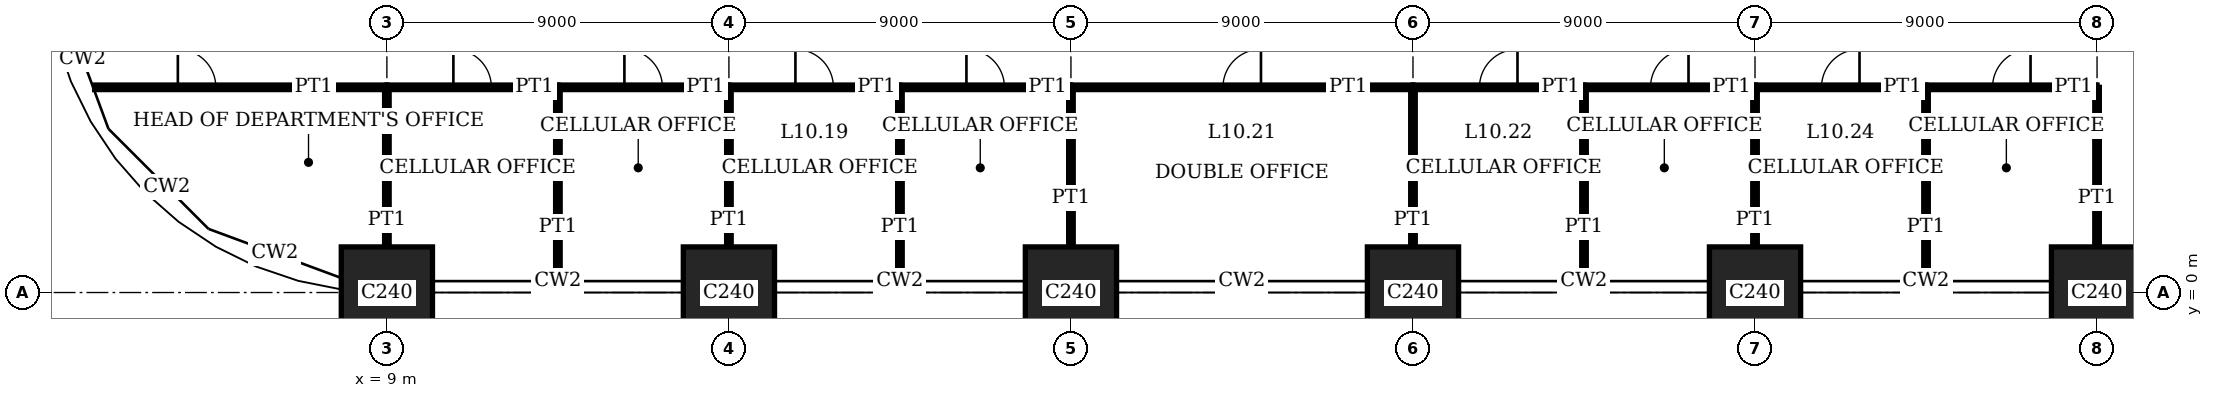
"""IFC4 building model, lengths in metres.
Left out: names, types, materials, properties, quantities, classifications, styles, units other than length and angle.
Written with IfcOpenShell. Run it as: python <this file> out.ifc"""

import sys

from ifc_helpers import new_model, si_unit, direction, frame, frame_2d, origin, origin_2d, place, context, subcontext, project, spatial, rectangle, extrude, element, fill, save


model = new_model("IFC4")
c1 = context("Model", 3, precision=1e-05, world=origin(), true_north=direction((0.0, 1.0)))
c2 = subcontext(c1, "Body", "Model", "MODEL_VIEW")
j1 = project(units=[si_unit("LENGTHUNIT", "METRE"), si_unit("PLANEANGLEUNIT", "RADIAN")], contexts=[c1])
p1 = place(None, origin())
s1 = spatial("IfcSite", under=j1, at=p1, CompositionType="ELEMENT")
p2 = place(p1, origin())
s2 = spatial("IfcBuilding", under=s1, at=p2, CompositionType="ELEMENT")
p3 = place(p2, frame((0.0, 0.0, 43.8)))
s3 = spatial("IfcBuildingStorey", under=s2, at=p3, CompositionType="ELEMENT", Elevation=43.8)
for number, where, z_axis, x_axis in (
    (1, (9.0, 0.0, 0.0), (0.0, 0.0, 1.0), (1.0, 0.0, 0.0)),
    (2, (18.0, 0.0, 0.0), (0.0, 0.0, 1.0), (1.0, 0.0, 0.0)),
    (3, (27.0, 0.0, 0.0), (0.0, 0.0, 1.0), (1.0, 0.0, 0.0)),
    (4, (36.0, 0.0, 0.0), (0.0, 0.0, 1.0), (1.0, 0.0, 0.0)),
    (5, (45.0, 0.0, 0.0), (0.0, 0.0, 1.0), (1.0, 0.0, 0.0)),
    (6, (54.0, 0.0, 0.0), (0.0, 0.0, 1.0), (1.0, 0.0, 0.0)),
):
    element("IfcColumn", number, at=place(p3, frame(where, z_axis=z_axis, x_axis=x_axis)), inside=s3, PredefinedType="COLUMN", context=c2, shape_type="SweptSolid", body=[
        extrude(rectangle(XDim=2.4, YDim=2.4, at=origin_2d()), origin(), (0.0, 0.0, 1.0), 4.0),
    ])
p4 = place(p3, frame((9.0, 5.4, 0.0), z_axis=(0.0, 0.0, 1.0), x_axis=(1.0, 0.0, 0.0)))
e7 = element("IfcWall", 7, at=p4, inside=s3, PredefinedType="PARTITIONING", context=c2, shape_type="SweptSolid", body=[
    extrude(rectangle(XDim=4.5, YDim=0.12, at=frame_2d((2.25, 0.0))), origin(), (0.0, 0.0, 1.0), 3.75),
])
p5 = place(p4, frame((1.75, 0.0, 0.0)))
e8 = element("IfcOpeningElement", 8, at=p5, cuts=e7, PredefinedType="OPENING", context=c2, shape_type="SweptSolid", body=[
    extrude(rectangle(XDim=1.0, YDim=2.4, at=frame_2d((0.5, 1.2))), frame((0.0, 0.07, 0.0), z_axis=(0.0, -1.0, 0.0), x_axis=(1.0, 0.0, 0.0)), (0.0, 0.0, 1.0), 0.14),
])
p6 = place(p3, frame((13.5, 5.4, 0.0), z_axis=(0.0, 0.0, 1.0), x_axis=(1.0, 0.0, 0.0)))
e9 = element("IfcWall", 9, at=p6, inside=s3, PredefinedType="PARTITIONING", context=c2, shape_type="SweptSolid", body=[
    extrude(rectangle(XDim=4.5, YDim=0.12, at=frame_2d((2.25, 0.0))), origin(), (0.0, 0.0, 1.0), 3.75),
])
p7 = place(p6, frame((1.75, 0.0, 0.0)))
e10 = element("IfcOpeningElement", 10, at=p7, cuts=e9, PredefinedType="OPENING", context=c2, shape_type="SweptSolid", body=[
    extrude(rectangle(XDim=1.0, YDim=2.4, at=frame_2d((0.5, 1.2))), frame((0.0, 0.07, 0.0), z_axis=(0.0, -1.0, 0.0), x_axis=(1.0, 0.0, 0.0)), (0.0, 0.0, 1.0), 0.14),
])
p8 = place(p3, frame((18.0, 5.4, 0.0), z_axis=(0.0, 0.0, 1.0), x_axis=(1.0, 0.0, 0.0)))
e11 = element("IfcWall", 11, at=p8, inside=s3, PredefinedType="PARTITIONING", context=c2, shape_type="SweptSolid", body=[
    extrude(rectangle(XDim=4.5, YDim=0.12, at=frame_2d((2.25, 0.0))), origin(), (0.0, 0.0, 1.0), 3.75),
])
p9 = place(p8, frame((1.75, 0.0, 0.0)))
e12 = element("IfcOpeningElement", 12, at=p9, cuts=e11, PredefinedType="OPENING", context=c2, shape_type="SweptSolid", body=[
    extrude(rectangle(XDim=1.0, YDim=2.4, at=frame_2d((0.5, 1.2))), frame((0.0, 0.07, 0.0), z_axis=(0.0, -1.0, 0.0), x_axis=(1.0, 0.0, 0.0)), (0.0, 0.0, 1.0), 0.14),
])
p10 = place(p3, frame((22.5, 5.4, 0.0), z_axis=(0.0, 0.0, 1.0), x_axis=(1.0, 0.0, 0.0)))
e13 = element("IfcWall", 13, at=p10, inside=s3, PredefinedType="PARTITIONING", context=c2, shape_type="SweptSolid", body=[
    extrude(rectangle(XDim=4.5, YDim=0.12, at=frame_2d((2.25, 0.0))), origin(), (0.0, 0.0, 1.0), 3.75),
])
p11 = place(p10, frame((1.75, 0.0, 0.0)))
e14 = element("IfcOpeningElement", 14, at=p11, cuts=e13, PredefinedType="OPENING", context=c2, shape_type="SweptSolid", body=[
    extrude(rectangle(XDim=1.0, YDim=2.4, at=frame_2d((0.5, 1.2))), frame((0.0, 0.07, 0.0), z_axis=(0.0, -1.0, 0.0), x_axis=(1.0, 0.0, 0.0)), (0.0, 0.0, 1.0), 0.14),
])
p12 = place(p3, frame((27.0, 5.4, 0.0), z_axis=(0.0, 0.0, 1.0), x_axis=(1.0, 0.0, 0.0)))
e15 = element("IfcWall", 15, at=p12, inside=s3, PredefinedType="PARTITIONING", context=c2, shape_type="SweptSolid", body=[
    extrude(rectangle(XDim=9.0, YDim=0.12, at=frame_2d((4.5, 0.0))), origin(), (0.0, 0.0, 1.0), 3.75),
])
p13 = place(p12, frame((4.0, 0.0, 0.0)))
e16 = element("IfcOpeningElement", 16, at=p13, cuts=e15, PredefinedType="OPENING", context=c2, shape_type="SweptSolid", body=[
    extrude(rectangle(XDim=1.0, YDim=2.4, at=frame_2d((0.5, 1.2))), frame((0.0, 0.07, 0.0), z_axis=(0.0, -1.0, 0.0), x_axis=(1.0, 0.0, 0.0)), (0.0, 0.0, 1.0), 0.14),
])
p14 = place(p3, frame((36.0, 5.4, 0.0), z_axis=(0.0, 0.0, 1.0), x_axis=(1.0, 0.0, 0.0)))
e17 = element("IfcWall", 17, at=p14, inside=s3, PredefinedType="PARTITIONING", context=c2, shape_type="SweptSolid", body=[
    extrude(rectangle(XDim=4.5, YDim=0.12, at=frame_2d((2.25, 0.0))), origin(), (0.0, 0.0, 1.0), 3.75),
])
p15 = place(p14, frame((1.75, 0.0, 0.0)))
e18 = element("IfcOpeningElement", 18, at=p15, cuts=e17, PredefinedType="OPENING", context=c2, shape_type="SweptSolid", body=[
    extrude(rectangle(XDim=1.0, YDim=2.4, at=frame_2d((0.5, 1.2))), frame((0.0, 0.07, 0.0), z_axis=(0.0, -1.0, 0.0), x_axis=(1.0, 0.0, 0.0)), (0.0, 0.0, 1.0), 0.14),
])
p16 = place(p3, frame((40.5, 5.4, 0.0), z_axis=(0.0, 0.0, 1.0), x_axis=(1.0, 0.0, 0.0)))
e19 = element("IfcWall", 19, at=p16, inside=s3, PredefinedType="PARTITIONING", context=c2, shape_type="SweptSolid", body=[
    extrude(rectangle(XDim=4.5, YDim=0.12, at=frame_2d((2.25, 0.0))), origin(), (0.0, 0.0, 1.0), 3.75),
])
p17 = place(p16, frame((1.75, 0.0, 0.0)))
e20 = element("IfcOpeningElement", 20, at=p17, cuts=e19, PredefinedType="OPENING", context=c2, shape_type="SweptSolid", body=[
    extrude(rectangle(XDim=1.0, YDim=2.4, at=frame_2d((0.5, 1.2))), frame((0.0, 0.07, 0.0), z_axis=(0.0, -1.0, 0.0), x_axis=(1.0, 0.0, 0.0)), (0.0, 0.0, 1.0), 0.14),
])
p18 = place(p3, frame((45.0, 5.4, 0.0), z_axis=(0.0, 0.0, 1.0), x_axis=(1.0, 0.0, 0.0)))
e21 = element("IfcWall", 21, at=p18, inside=s3, PredefinedType="PARTITIONING", context=c2, shape_type="SweptSolid", body=[
    extrude(rectangle(XDim=4.5, YDim=0.12, at=frame_2d((2.25, 0.0))), origin(), (0.0, 0.0, 1.0), 3.75),
])
p19 = place(p18, frame((1.75, 0.0, 0.0)))
e22 = element("IfcOpeningElement", 22, at=p19, cuts=e21, PredefinedType="OPENING", context=c2, shape_type="SweptSolid", body=[
    extrude(rectangle(XDim=1.0, YDim=2.4, at=frame_2d((0.5, 1.2))), frame((0.0, 0.07, 0.0), z_axis=(0.0, -1.0, 0.0), x_axis=(1.0, 0.0, 0.0)), (0.0, 0.0, 1.0), 0.14),
])
p20 = place(p3, frame((49.5, 5.4, 0.0), z_axis=(0.0, 0.0, 1.0), x_axis=(1.0, 0.0, 0.0)))
e23 = element("IfcWall", 23, at=p20, inside=s3, PredefinedType="PARTITIONING", context=c2, shape_type="SweptSolid", body=[
    extrude(rectangle(XDim=4.5, YDim=0.12, at=frame_2d((2.25, 0.0))), origin(), (0.0, 0.0, 1.0), 3.75),
])
p21 = place(p20, frame((1.75, 0.0, 0.0)))
e24 = element("IfcOpeningElement", 24, at=p21, cuts=e23, PredefinedType="OPENING", context=c2, shape_type="SweptSolid", body=[
    extrude(rectangle(XDim=1.0, YDim=2.4, at=frame_2d((0.5, 1.2))), frame((0.0, 0.07, 0.0), z_axis=(0.0, -1.0, 0.0), x_axis=(1.0, 0.0, 0.0)), (0.0, 0.0, 1.0), 0.14),
])
p22 = place(p3, frame((1.31, 5.4, 0.0), z_axis=(0.0, 0.0, 1.0), x_axis=(1.0, 0.0, 0.0)))
e25 = element("IfcWall", 25, at=p22, inside=s3, PredefinedType="PARTITIONING", context=c2, shape_type="SweptSolid", body=[
    extrude(rectangle(XDim=7.69, YDim=0.12, at=frame_2d((3.845, 0.0))), origin(), (0.0, 0.0, 1.0), 3.75),
])
p23 = place(p22, frame((2.19, 0.0, 0.0)))
e26 = element("IfcOpeningElement", 26, at=p23, cuts=e25, PredefinedType="OPENING", context=c2, shape_type="SweptSolid", body=[
    extrude(rectangle(XDim=1.0, YDim=2.4, at=frame_2d((0.5, 1.2))), frame((0.0, 0.07, 0.0), z_axis=(0.0, -1.0, 0.0), x_axis=(1.0, 0.0, 0.0)), (0.0, 0.0, 1.0), 0.14),
])
p24 = place(p3, frame((9.0, 1.2, 0.0), z_axis=(0.0, 0.0, 1.0), x_axis=(0.0, 1.0, 0.0)))
e27 = element("IfcWall", 27, at=p24, inside=s3, PredefinedType="PARTITIONING", context=c2, shape_type="SweptSolid", body=[
    extrude(rectangle(XDim=4.2, YDim=0.12, at=frame_2d((2.1, 0.0))), origin(), (0.0, 0.0, 1.0), 3.05),
])
p25 = place(p3, frame((13.5, 0.31, 0.0), z_axis=(0.0, 0.0, 1.0), x_axis=(0.0, 1.0, 0.0)))
e28 = element("IfcWall", 28, at=p25, inside=s3, PredefinedType="PARTITIONING", context=c2, shape_type="SweptSolid", body=[
    extrude(rectangle(XDim=5.09, YDim=0.12, at=frame_2d((2.545, 0.0))), origin(), (0.0, 0.0, 1.0), 3.75),
])
p26 = place(p3, frame((18.0, 1.2, 0.0), z_axis=(0.0, 0.0, 1.0), x_axis=(0.0, 1.0, 0.0)))
e29 = element("IfcWall", 29, at=p26, inside=s3, PredefinedType="PARTITIONING", context=c2, shape_type="SweptSolid", body=[
    extrude(rectangle(XDim=4.2, YDim=0.12, at=frame_2d((2.1, 0.0))), origin(), (0.0, 0.0, 1.0), 3.05),
])
p27 = place(p3, frame((22.5, 0.31, 0.0), z_axis=(0.0, 0.0, 1.0), x_axis=(0.0, 1.0, 0.0)))
e30 = element("IfcWall", 30, at=p27, inside=s3, PredefinedType="PARTITIONING", context=c2, shape_type="SweptSolid", body=[
    extrude(rectangle(XDim=5.09, YDim=0.12, at=frame_2d((2.545, 0.0))), origin(), (0.0, 0.0, 1.0), 3.75),
])
for number, where, z_axis, x_axis in (
    (31, (27.0, 1.2, 0.0), (0.0, 0.0, 1.0), (0.0, 1.0, 0.0)),
    (32, (36.0, 1.2, 0.0), (0.0, 0.0, 1.0), (0.0, 1.0, 0.0)),
):
    element("IfcWall", number, at=place(p3, frame(where, z_axis=z_axis, x_axis=x_axis)), inside=s3, PredefinedType="PARTITIONING", context=c2, shape_type="SweptSolid", body=[
        extrude(rectangle(XDim=4.2, YDim=0.12, at=frame_2d((2.1, 0.0))), origin(), (0.0, 0.0, 1.0), 3.05),
    ])
p28 = place(p3, frame((40.5, 0.31, 0.0), z_axis=(0.0, 0.0, 1.0), x_axis=(0.0, 1.0, 0.0)))
e33 = element("IfcWall", 33, at=p28, inside=s3, PredefinedType="PARTITIONING", context=c2, shape_type="SweptSolid", body=[
    extrude(rectangle(XDim=5.09, YDim=0.12, at=frame_2d((2.545, 0.0))), origin(), (0.0, 0.0, 1.0), 3.75),
])
p29 = place(p3, frame((45.0, 1.2, 0.0), z_axis=(0.0, 0.0, 1.0), x_axis=(0.0, 1.0, 0.0)))
e34 = element("IfcWall", 34, at=p29, inside=s3, PredefinedType="PARTITIONING", context=c2, shape_type="SweptSolid", body=[
    extrude(rectangle(XDim=4.2, YDim=0.12, at=frame_2d((2.1, 0.0))), origin(), (0.0, 0.0, 1.0), 3.05),
])
p30 = place(p3, frame((49.5, 0.31, 0.0), z_axis=(0.0, 0.0, 1.0), x_axis=(0.0, 1.0, 0.0)))
e35 = element("IfcWall", 35, at=p30, inside=s3, PredefinedType="PARTITIONING", context=c2, shape_type="SweptSolid", body=[
    extrude(rectangle(XDim=5.09, YDim=0.12, at=frame_2d((2.545, 0.0))), origin(), (0.0, 0.0, 1.0), 3.75),
])
p31 = place(p3, frame((54.0, 1.2, 0.0), z_axis=(0.0, 0.0, 1.0), x_axis=(0.0, 1.0, 0.0)))
e36 = element("IfcWall", 36, at=p31, inside=s3, PredefinedType="PARTITIONING", context=c2, shape_type="SweptSolid", body=[
    extrude(rectangle(XDim=4.2, YDim=0.12, at=frame_2d((2.1, 0.0))), origin(), (0.0, 0.0, 1.0), 3.05),
])
p32 = place(p5, origin())
e37 = element("IfcDoor", 37, at=p32, inside=s3, OperationType="SINGLE_SWING_RIGHT", PredefinedType="DOOR", context=c2, shape_type="SweptSolid", body=[
    extrude(rectangle(XDim=1.0, YDim=2.4, at=frame_2d((0.5, 1.2))), frame((0.0, 0.025, 0.0), z_axis=(0.0, -1.0, 0.0), x_axis=(1.0, 0.0, 0.0)), (0.0, 0.0, 1.0), 0.05),
])
fill(e8, e37)
p33 = place(p7, origin())
e38 = element("IfcDoor", 38, at=p33, inside=s3, OperationType="SINGLE_SWING_RIGHT", PredefinedType="DOOR", context=c2, shape_type="SweptSolid", body=[
    extrude(rectangle(XDim=1.0, YDim=2.4, at=frame_2d((0.5, 1.2))), frame((0.0, 0.025, 0.0), z_axis=(0.0, -1.0, 0.0), x_axis=(1.0, 0.0, 0.0)), (0.0, 0.0, 1.0), 0.05),
])
fill(e10, e38)
p34 = place(p9, origin())
e39 = element("IfcDoor", 39, at=p34, inside=s3, OperationType="SINGLE_SWING_RIGHT", PredefinedType="DOOR", context=c2, shape_type="SweptSolid", body=[
    extrude(rectangle(XDim=1.0, YDim=2.4, at=frame_2d((0.5, 1.2))), frame((0.0, 0.025, 0.0), z_axis=(0.0, -1.0, 0.0), x_axis=(1.0, 0.0, 0.0)), (0.0, 0.0, 1.0), 0.05),
])
fill(e12, e39)
p35 = place(p11, origin())
e40 = element("IfcDoor", 40, at=p35, inside=s3, OperationType="SINGLE_SWING_RIGHT", PredefinedType="DOOR", context=c2, shape_type="SweptSolid", body=[
    extrude(rectangle(XDim=1.0, YDim=2.4, at=frame_2d((0.5, 1.2))), frame((0.0, 0.025, 0.0), z_axis=(0.0, -1.0, 0.0), x_axis=(1.0, 0.0, 0.0)), (0.0, 0.0, 1.0), 0.05),
])
fill(e14, e40)
p36 = place(p13, origin())
e41 = element("IfcDoor", 41, at=p36, inside=s3, OperationType="SINGLE_SWING_LEFT", PredefinedType="DOOR", context=c2, shape_type="SweptSolid", body=[
    extrude(rectangle(XDim=1.0, YDim=2.4, at=frame_2d((0.5, 1.2))), frame((0.0, 0.025, 0.0), z_axis=(0.0, -1.0, 0.0), x_axis=(1.0, 0.0, 0.0)), (0.0, 0.0, 1.0), 0.05),
])
fill(e16, e41)
p37 = place(p15, origin())
e42 = element("IfcDoor", 42, at=p37, inside=s3, OperationType="SINGLE_SWING_LEFT", PredefinedType="DOOR", context=c2, shape_type="SweptSolid", body=[
    extrude(rectangle(XDim=1.0, YDim=2.4, at=frame_2d((0.5, 1.2))), frame((0.0, 0.025, 0.0), z_axis=(0.0, -1.0, 0.0), x_axis=(1.0, 0.0, 0.0)), (0.0, 0.0, 1.0), 0.05),
])
fill(e18, e42)
p38 = place(p17, origin())
e43 = element("IfcDoor", 43, at=p38, inside=s3, OperationType="SINGLE_SWING_LEFT", PredefinedType="DOOR", context=c2, shape_type="SweptSolid", body=[
    extrude(rectangle(XDim=1.0, YDim=2.4, at=frame_2d((0.5, 1.2))), frame((0.0, 0.025, 0.0), z_axis=(0.0, -1.0, 0.0), x_axis=(1.0, 0.0, 0.0)), (0.0, 0.0, 1.0), 0.05),
])
fill(e20, e43)
p39 = place(p19, origin())
e44 = element("IfcDoor", 44, at=p39, inside=s3, OperationType="SINGLE_SWING_LEFT", PredefinedType="DOOR", context=c2, shape_type="SweptSolid", body=[
    extrude(rectangle(XDim=1.0, YDim=2.4, at=frame_2d((0.5, 1.2))), frame((0.0, 0.025, 0.0), z_axis=(0.0, -1.0, 0.0), x_axis=(1.0, 0.0, 0.0)), (0.0, 0.0, 1.0), 0.05),
])
fill(e22, e44)
p40 = place(p21, origin())
e45 = element("IfcDoor", 45, at=p40, inside=s3, OperationType="SINGLE_SWING_LEFT", PredefinedType="DOOR", context=c2, shape_type="SweptSolid", body=[
    extrude(rectangle(XDim=1.0, YDim=2.4, at=frame_2d((0.5, 1.2))), frame((0.0, 0.025, 0.0), z_axis=(0.0, -1.0, 0.0), x_axis=(1.0, 0.0, 0.0)), (0.0, 0.0, 1.0), 0.05),
])
fill(e24, e45)
p41 = place(p23, origin())
e46 = element("IfcDoor", 46, at=p41, inside=s3, OperationType="SINGLE_SWING_RIGHT", PredefinedType="DOOR", context=c2, shape_type="SweptSolid", body=[
    extrude(rectangle(XDim=1.0, YDim=2.4, at=frame_2d((0.5, 1.2))), frame((0.0, 0.025, 0.0), z_axis=(0.0, -1.0, 0.0), x_axis=(1.0, 0.0, 0.0)), (0.0, 0.0, 1.0), 0.05),
])
fill(e26, e46)
save(model, sys.argv[1])
